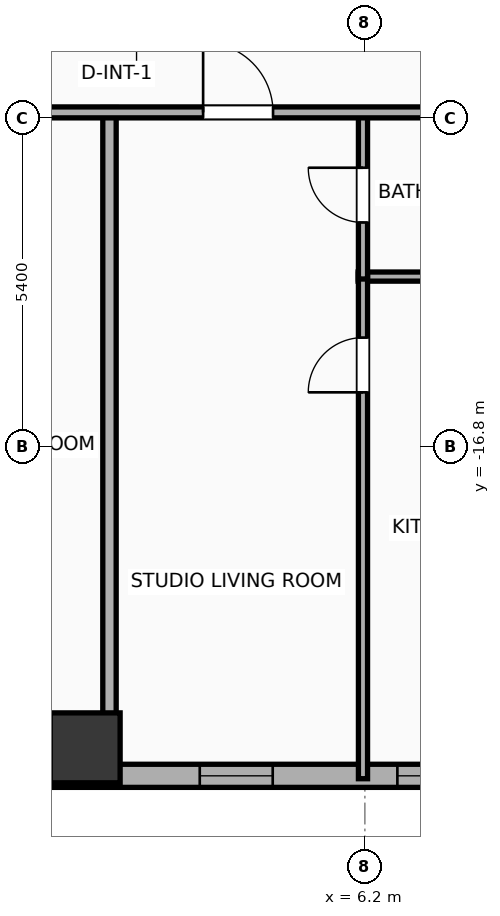
"""IFC4 building model, lengths in metres.
Left out: names, types, materials, properties, quantities, classifications, styles, units other than length and angle.
Written with IfcOpenShell. Run it as: python <this file> out.ifc"""

import sys

from ifc_helpers import new_model, si_unit, direction, frame, frame_2d, origin, origin_2d, place, context, subcontext, project, spatial, rectangle, hollow_rectangle, extrude, element, fill, save


model = new_model("IFC4")
c1 = context("Model", 3, precision=1e-05, world=origin(), true_north=direction((0.0, 1.0)))
c2 = subcontext(c1, "Body", "Model", "MODEL_VIEW")
j1 = project(units=[si_unit("LENGTHUNIT", "METRE"), si_unit("PLANEANGLEUNIT", "RADIAN")], contexts=[c1])
p1 = place(None, origin())
s1 = spatial("IfcSite", under=j1, at=p1, CompositionType="ELEMENT")
p2 = place(p1, origin())
s2 = spatial("IfcBuilding", under=s1, at=p2, CompositionType="ELEMENT")
p3 = place(p2, frame((0.0, 0.0, 49.4)))
s3 = spatial("IfcBuildingStorey", under=s2, at=p3, CompositionType="ELEMENT", Elevation=49.4)
p4 = place(p3, frame((1.6, -21.75, 0.0), z_axis=(0.0, 0.0, 1.0), x_axis=(1.0, 0.0, 0.0)))
e1 = element("IfcColumn", 1, at=p4, inside=s3, PredefinedType="COLUMN", context=c2, shape_type="SweptSolid", body=[
    extrude(hollow_rectangle(XDim=1.15, YDim=1.15, WallThickness=0.04, at=origin_2d()), origin(), (0.0, 0.0, 1.0), 3.9),
])
p5 = place(p3, frame((22.381, -22.21, 0.0), z_axis=(0.0, 0.0, 1.0), x_axis=(-1.0, 0.0, 0.0)))
e2 = element("IfcWall", 2, at=p5, inside=s3, PredefinedType="ELEMENTEDWALL", context=c2, shape_type="SweptSolid", body=[
    extrude(rectangle(XDim=51.963, YDim=0.38, at=frame_2d((25.981, 0.0))), origin(), (0.0, 0.0, 1.0), 3.65),
])
p6 = place(p5, frame((49.952, 0.0, 0.75)))
e3 = element("IfcOpeningElement", 3, at=p6, cuts=e2, PredefinedType="OPENING", context=c2, shape_type="SweptSolid", body=[
    extrude(rectangle(XDim=1.2, YDim=2.05, at=frame_2d((0.6, 1.025))), frame((0.0, 0.2, 0.0), z_axis=(0.0, -1.0, 0.0), x_axis=(1.0, 0.0, 0.0)), (0.0, 0.0, 1.0), 0.4),
])
p7 = place(p5, frame((47.486, 0.0, 0.75)))
e4 = element("IfcOpeningElement", 4, at=p7, cuts=e2, PredefinedType="OPENING", context=c2, shape_type="SweptSolid", body=[
    extrude(rectangle(XDim=1.2, YDim=2.05, at=frame_2d((0.6, 1.025))), frame((0.0, 0.2, 0.0), z_axis=(0.0, -1.0, 0.0), x_axis=(1.0, 0.0, 0.0)), (0.0, 0.0, 1.0), 0.4),
])
p8 = place(p5, frame((42.361, 0.0, 0.75)))
e5 = element("IfcOpeningElement", 5, at=p8, cuts=e2, PredefinedType="OPENING", context=c2, shape_type="SweptSolid", body=[
    extrude(rectangle(XDim=0.85, YDim=2.05, at=frame_2d((0.425, 1.025))), frame((0.0, 0.2, 0.0), z_axis=(0.0, -1.0, 0.0), x_axis=(1.0, 0.0, 0.0)), (0.0, 0.0, 1.0), 0.4),
])
p9 = place(p5, frame((44.476, 0.0, 0.75)))
e6 = element("IfcOpeningElement", 6, at=p9, cuts=e2, PredefinedType="OPENING", context=c2, shape_type="SweptSolid", body=[
    extrude(rectangle(XDim=1.2, YDim=2.05, at=frame_2d((0.6, 1.025))), frame((0.0, 0.2, 0.0), z_axis=(0.0, -1.0, 0.0), x_axis=(1.0, 0.0, 0.0)), (0.0, 0.0, 1.0), 0.4),
])
p10 = place(p5, frame((34.811, 0.0, 0.75)))
e7 = element("IfcOpeningElement", 7, at=p10, cuts=e2, PredefinedType="OPENING", context=c2, shape_type="SweptSolid", body=[
    extrude(rectangle(XDim=1.2, YDim=2.05, at=frame_2d((0.6, 1.025))), frame((0.0, 0.2, 0.0), z_axis=(0.0, -1.0, 0.0), x_axis=(1.0, 0.0, 0.0)), (0.0, 0.0, 1.0), 0.4),
])
p11 = place(p5, frame((38.061, 0.0, 0.75)))
e8 = element("IfcOpeningElement", 8, at=p11, cuts=e2, PredefinedType="OPENING", context=c2, shape_type="SweptSolid", body=[
    extrude(rectangle(XDim=1.2, YDim=2.05, at=frame_2d((0.6, 1.025))), frame((0.0, 0.2, 0.0), z_axis=(0.0, -1.0, 0.0), x_axis=(1.0, 0.0, 0.0)), (0.0, 0.0, 1.0), 0.4),
])
p12 = place(p5, frame((29.171, 0.0, 0.75)))
e9 = element("IfcOpeningElement", 9, at=p12, cuts=e2, PredefinedType="OPENING", context=c2, shape_type="SweptSolid", body=[
    extrude(rectangle(XDim=1.2, YDim=2.05, at=frame_2d((0.6, 1.025))), frame((0.0, 0.2, 0.0), z_axis=(0.0, -1.0, 0.0), x_axis=(1.0, 0.0, 0.0)), (0.0, 0.0, 1.0), 0.4),
])
p13 = place(p5, frame((21.757, 0.0, 0.75)))
e10 = element("IfcOpeningElement", 10, at=p13, cuts=e2, PredefinedType="OPENING", context=c2, shape_type="SweptSolid", body=[
    extrude(rectangle(XDim=1.2, YDim=2.05, at=frame_2d((0.6, 1.025))), frame((0.0, 0.2, 0.0), z_axis=(0.0, -1.0, 0.0), x_axis=(1.0, 0.0, 0.0)), (0.0, 0.0, 1.0), 0.4),
])
p14 = place(p5, frame((25.007, 0.0, 0.75)))
e11 = element("IfcOpeningElement", 11, at=p14, cuts=e2, PredefinedType="OPENING", context=c2, shape_type="SweptSolid", body=[
    extrude(rectangle(XDim=1.2, YDim=2.05, at=frame_2d((0.6, 1.025))), frame((0.0, 0.2, 0.0), z_axis=(0.0, -1.0, 0.0), x_axis=(1.0, 0.0, 0.0)), (0.0, 0.0, 1.0), 0.4),
])
p15 = place(p5, frame((17.697, 0.0, 0.75)))
e12 = element("IfcOpeningElement", 12, at=p15, cuts=e2, PredefinedType="OPENING", context=c2, shape_type="SweptSolid", body=[
    extrude(rectangle(XDim=1.2, YDim=2.05, at=frame_2d((0.6, 1.025))), frame((0.0, 0.2, 0.0), z_axis=(0.0, -1.0, 0.0), x_axis=(1.0, 0.0, 0.0)), (0.0, 0.0, 1.0), 0.4),
])
p16 = place(p5, frame((14.447, 0.0, 0.75)))
e13 = element("IfcOpeningElement", 13, at=p16, cuts=e2, PredefinedType="OPENING", context=c2, shape_type="SweptSolid", body=[
    extrude(rectangle(XDim=1.2, YDim=2.05, at=frame_2d((0.6, 1.025))), frame((0.0, 0.2, 0.0), z_axis=(0.0, -1.0, 0.0), x_axis=(1.0, 0.0, 0.0)), (0.0, 0.0, 1.0), 0.4),
])
p17 = place(p5, frame((11.231, 0.0, 0.75)))
e14 = element("IfcOpeningElement", 14, at=p17, cuts=e2, PredefinedType="OPENING", context=c2, shape_type="SweptSolid", body=[
    extrude(rectangle(XDim=1.2, YDim=2.05, at=frame_2d((0.6, 1.025))), frame((0.0, 0.2, 0.0), z_axis=(0.0, -1.0, 0.0), x_axis=(1.0, 0.0, 0.0)), (0.0, 0.0, 1.0), 0.4),
])
p18 = place(p5, frame((5.082, 0.0, 0.75)))
e15 = element("IfcOpeningElement", 15, at=p18, cuts=e2, PredefinedType="OPENING", context=c2, shape_type="SweptSolid", body=[
    extrude(rectangle(XDim=1.2, YDim=2.05, at=frame_2d((0.6, 1.025))), frame((0.0, 0.2, 0.0), z_axis=(0.0, -1.0, 0.0), x_axis=(1.0, 0.0, 0.0)), (0.0, 0.0, 1.0), 0.4),
])
p19 = place(p5, frame((2.277, 0.0, 0.75)))
e16 = element("IfcOpeningElement", 16, at=p19, cuts=e2, PredefinedType="OPENING", context=c2, shape_type="SweptSolid", body=[
    extrude(rectangle(XDim=1.2, YDim=2.05, at=frame_2d((0.6, 1.025))), frame((0.0, 0.2, 0.0), z_axis=(0.0, -1.0, 0.0), x_axis=(1.0, 0.0, 0.0)), (0.0, 0.0, 1.0), 0.4),
])
p20 = place(p5, frame((1.071, 0.0, 0.75)))
e17 = element("IfcOpeningElement", 17, at=p20, cuts=e2, PredefinedType="OPENING", context=c2, shape_type="SweptSolid", body=[
    extrude(rectangle(XDim=0.52, YDim=2.05, at=frame_2d((0.26, 1.025))), frame((0.0, 0.2, 0.0), z_axis=(0.0, -1.0, 0.0), x_axis=(1.0, 0.0, 0.0)), (0.0, 0.0, 1.0), 0.4),
])
p21 = place(p3, frame((2.0, -22.21, 0.0), z_axis=(0.0, 0.0, 1.0), x_axis=(0.0, 1.0, 0.0)))
e18 = element("IfcWall", 18, at=p21, inside=s3, PredefinedType="PARTITIONING", context=c2, shape_type="SweptSolid", body=[
    extrude(rectangle(XDim=10.99, YDim=0.22, at=frame_2d((5.495, 0.0))), origin(), (0.0, 0.0, 1.0), 2.94),
])
p22 = place(p3, frame((6.089, -14.0, 0.0), z_axis=(0.0, 0.0, 1.0), x_axis=(1.0, 0.0, 0.0)))
e19 = element("IfcWall", 19, at=p22, inside=s3, PredefinedType="PLUMBINGWALL", context=c2, shape_type="SweptSolid", body=[
    extrude(rectangle(XDim=2.671, YDim=0.15, at=frame_2d((1.335, 0.0))), origin(), (0.0, 0.0, 1.0), 3.65),
])
p23 = place(p3, frame((6.169, -22.258, 0.0), z_axis=(0.0, 0.0, 1.0), x_axis=(0.0, 1.0, 0.0)))
e20 = element("IfcWall", 20, at=p23, inside=s3, PredefinedType="PLUMBINGWALL", context=c2, shape_type="SweptSolid", body=[
    extrude(rectangle(XDim=8.298, YDim=0.15, at=frame_2d((4.149, 0.0))), origin(), (0.0, 0.0, 1.0), 3.65),
])
p24 = place(p23, frame((6.354, 0.0, 0.0)))
e21 = element("IfcOpeningElement", 21, at=p24, cuts=e20, PredefinedType="OPENING", context=c2, shape_type="SweptSolid", body=[
    extrude(rectangle(XDim=0.9, YDim=2.05, at=frame_2d((0.45, 1.025))), frame((0.0, 0.085, 0.0), z_axis=(0.0, -1.0, 0.0), x_axis=(1.0, 0.0, 0.0)), (0.0, 0.0, 1.0), 0.17),
])
p25 = place(p3, frame((6.169, -14.04, 0.0), z_axis=(0.0, 0.0, 1.0), x_axis=(0.0, 1.0, 0.0)))
e22 = element("IfcWall", 22, at=p25, inside=s3, PredefinedType="PLUMBINGWALL", context=c2, shape_type="SweptSolid", body=[
    extrude(rectangle(XDim=2.76, YDim=0.15, at=frame_2d((1.38, 0.0))), origin(), (0.0, 0.0, 1.0), 3.65),
])
p26 = place(p25, frame((0.93, 0.0, 0.0)))
e23 = element("IfcOpeningElement", 23, at=p26, cuts=e22, PredefinedType="OPENING", context=c2, shape_type="SweptSolid", body=[
    extrude(rectangle(XDim=0.9, YDim=2.05, at=frame_2d((0.45, 1.025))), frame((0.0, 0.085, 0.0), z_axis=(0.0, -1.0, 0.0), x_axis=(1.0, 0.0, 0.0)), (0.0, 0.0, 1.0), 0.17),
])
p27 = place(p3, frame((-33.41, -11.3, 0.0), z_axis=(0.0, 0.0, 1.0), x_axis=(1.0, 0.0, 0.0)))
e24 = element("IfcWall", 24, at=p27, inside=s3, PredefinedType="PARTITIONING", context=c2, shape_type="SweptSolid", body=[
    extrude(rectangle(XDim=59.62, YDim=0.18, at=frame_2d((29.81, 0.0))), origin(), (0.0, 0.0, 1.0), 3.65),
])
p28 = place(p27, frame((4.344, 0.0, 0.0)))
e25 = element("IfcOpeningElement", 25, at=p28, cuts=e24, PredefinedType="OPENING", context=c2, shape_type="SweptSolid", body=[
    extrude(rectangle(XDim=1.15, YDim=2.05, at=frame_2d((0.575, 1.025))), frame((0.0, 0.1, 0.0), z_axis=(0.0, -1.0, 0.0), x_axis=(1.0, 0.0, 0.0)), (0.0, 0.0, 1.0), 0.2),
])
p29 = place(p27, frame((13.358, 0.0, 0.0)))
e26 = element("IfcOpeningElement", 26, at=p29, cuts=e24, PredefinedType="OPENING", context=c2, shape_type="SweptSolid", body=[
    extrude(rectangle(XDim=1.15, YDim=2.05, at=frame_2d((0.575, 1.025))), frame((0.0, 0.1, 0.0), z_axis=(0.0, -1.0, 0.0), x_axis=(1.0, 0.0, 0.0)), (0.0, 0.0, 1.0), 0.2),
])
p30 = place(p27, frame((19.773, 0.0, 0.0)))
e27 = element("IfcOpeningElement", 27, at=p30, cuts=e24, PredefinedType="OPENING", context=c2, shape_type="SweptSolid", body=[
    extrude(rectangle(XDim=1.15, YDim=2.05, at=frame_2d((0.575, 1.025))), frame((0.0, 0.1, 0.0), z_axis=(0.0, -1.0, 0.0), x_axis=(1.0, 0.0, 0.0)), (0.0, 0.0, 1.0), 0.2),
])
p31 = place(p27, frame((25.336, 0.0, 0.0)))
e28 = element("IfcOpeningElement", 28, at=p31, cuts=e24, PredefinedType="OPENING", context=c2, shape_type="SweptSolid", body=[
    extrude(rectangle(XDim=0.9, YDim=2.05, at=frame_2d((0.45, 1.025))), frame((0.0, 0.1, 0.0), z_axis=(0.0, -1.0, 0.0), x_axis=(1.0, 0.0, 0.0)), (0.0, 0.0, 1.0), 0.2),
])
p32 = place(p27, frame((32.83, 0.0, 0.0)))
e29 = element("IfcOpeningElement", 29, at=p32, cuts=e24, PredefinedType="OPENING", context=c2, shape_type="SweptSolid", body=[
    extrude(rectangle(XDim=1.15, YDim=2.05, at=frame_2d((0.575, 1.025))), frame((0.0, 0.1, 0.0), z_axis=(0.0, -1.0, 0.0), x_axis=(1.0, 0.0, 0.0)), (0.0, 0.0, 1.0), 0.2),
])
p33 = place(p27, frame((36.95, 0.0, 0.0)))
e30 = element("IfcOpeningElement", 30, at=p33, cuts=e24, PredefinedType="OPENING", context=c2, shape_type="SweptSolid", body=[
    extrude(rectangle(XDim=1.15, YDim=2.05, at=frame_2d((0.575, 1.025))), frame((0.0, 0.1, 0.0), z_axis=(0.0, -1.0, 0.0), x_axis=(1.0, 0.0, 0.0)), (0.0, 0.0, 1.0), 0.2),
])
p34 = place(p27, frame((44.837, 0.0, 0.0)))
e31 = element("IfcOpeningElement", 31, at=p34, cuts=e24, PredefinedType="OPENING", context=c2, shape_type="SweptSolid", body=[
    extrude(rectangle(XDim=0.9, YDim=2.05, at=frame_2d((0.45, 1.025))), frame((0.0, 0.1, 0.0), z_axis=(0.0, -1.0, 0.0), x_axis=(1.0, 0.0, 0.0)), (0.0, 0.0, 1.0), 0.2),
])
p35 = place(p27, frame((49.565, 0.0, 0.0)))
e32 = element("IfcOpeningElement", 32, at=p35, cuts=e24, PredefinedType="OPENING", context=c2, shape_type="SweptSolid", body=[
    extrude(rectangle(XDim=1.15, YDim=2.05, at=frame_2d((0.575, 1.025))), frame((0.0, 0.1, 0.0), z_axis=(0.0, -1.0, 0.0), x_axis=(1.0, 0.0, 0.0)), (0.0, 0.0, 1.0), 0.2),
])
p36 = place(p27, frame((56.583, 0.0, 0.0)))
e33 = element("IfcOpeningElement", 33, at=p36, cuts=e24, PredefinedType="OPENING", context=c2, shape_type="SweptSolid", body=[
    extrude(rectangle(XDim=0.9, YDim=2.05, at=frame_2d((0.45, 1.025))), frame((0.0, 0.1, 0.0), z_axis=(0.0, -1.0, 0.0), x_axis=(1.0, 0.0, 0.0)), (0.0, 0.0, 1.0), 0.2),
])
p37 = place(p15, origin())
e34 = element("IfcWindow", 34, at=p37, inside=s3, PartitioningType="SINGLE_PANEL", PredefinedType="WINDOW", context=c2, shape_type="SweptSolid", body=[
    extrude(rectangle(XDim=1.2, YDim=2.05, at=frame_2d((0.6, 1.025))), frame((0.0, 0.03, 0.0), z_axis=(0.0, -1.0, 0.0), x_axis=(1.0, 0.0, 0.0)), (0.0, 0.0, 1.0), 0.06),
])
fill(e12, e34)
p38 = place(p16, origin())
e35 = element("IfcWindow", 35, at=p38, inside=s3, PartitioningType="SINGLE_PANEL", PredefinedType="WINDOW", context=c2, shape_type="SweptSolid", body=[
    extrude(rectangle(XDim=1.2, YDim=2.05, at=frame_2d((0.6, 1.025))), frame((0.0, 0.03, 0.0), z_axis=(0.0, -1.0, 0.0), x_axis=(1.0, 0.0, 0.0)), (0.0, 0.0, 1.0), 0.06),
])
fill(e13, e35)
p39 = place(p24, origin())
e36 = element("IfcDoor", 36, at=p39, inside=s3, OperationType="SINGLE_SWING_LEFT", PredefinedType="DOOR", context=c2, shape_type="SweptSolid", body=[
    extrude(rectangle(XDim=0.9, YDim=2.05, at=frame_2d((0.45, 1.025))), frame((0.0, 0.025, 0.0), z_axis=(0.0, -1.0, 0.0), x_axis=(1.0, 0.0, 0.0)), (0.0, 0.0, 1.0), 0.05),
])
fill(e21, e36)
p40 = place(p26, origin())
e37 = element("IfcDoor", 37, at=p40, inside=s3, OperationType="SINGLE_SWING_RIGHT", PredefinedType="DOOR", context=c2, shape_type="SweptSolid", body=[
    extrude(rectangle(XDim=0.9, YDim=2.05, at=frame_2d((0.45, 1.025))), frame((0.0, 0.025, 0.0), z_axis=(0.0, -1.0, 0.0), x_axis=(1.0, 0.0, 0.0)), (0.0, 0.0, 1.0), 0.05),
])
fill(e23, e37)
p41 = place(p33, origin())
e38 = element("IfcDoor", 38, at=p41, inside=s3, OperationType="SINGLE_SWING_LEFT", PredefinedType="DOOR", context=c2, shape_type="SweptSolid", body=[
    extrude(rectangle(XDim=1.15, YDim=2.05, at=frame_2d((0.575, 1.025))), frame((0.0, 0.025, 0.0), z_axis=(0.0, -1.0, 0.0), x_axis=(1.0, 0.0, 0.0)), (0.0, 0.0, 1.0), 0.05),
])
fill(e30, e38)
save(model, sys.argv[1])
